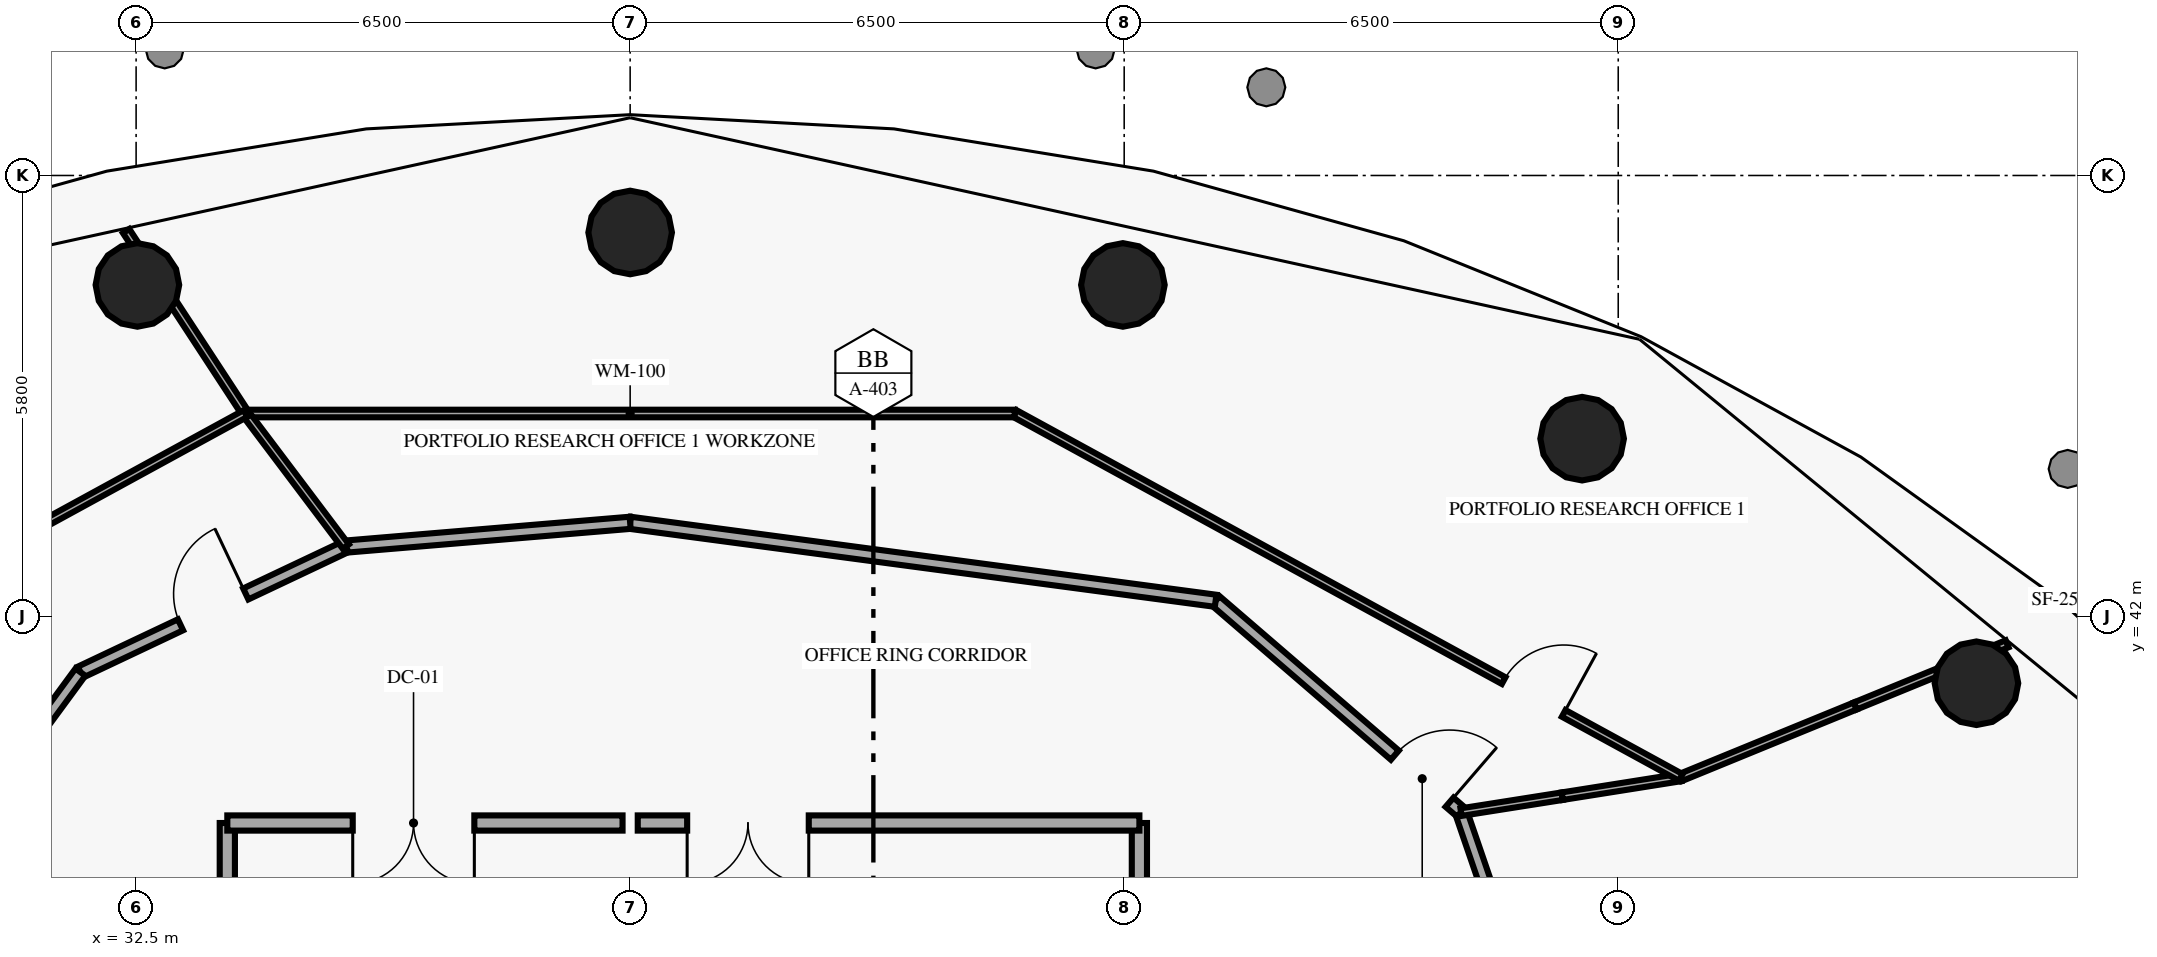
"""IFC4 building model, lengths in metres.
Left out: names, types, materials, properties, quantities, classifications, styles, units other than length and angle.
Written with IfcOpenShell. Run it as: python <this file> out.ifc"""

import sys

from ifc_helpers import new_model, si_unit, direction, frame, frame_2d, origin, origin_2d, place, context, subcontext, project, spatial, rectangle, circle, extrude, element, fill, save


model = new_model("IFC4")
c1 = context("Model", 3, precision=1e-05, world=origin(), true_north=direction((0.0, 1.0)))
c2 = subcontext(c1, "Body", "Model", "MODEL_VIEW")
j1 = project(units=[si_unit("LENGTHUNIT", "METRE"), si_unit("PLANEANGLEUNIT", "RADIAN")], contexts=[c1])
p1 = place(None, origin())
s1 = spatial("IfcSite", under=j1, at=p1, CompositionType="ELEMENT")
p2 = place(p1, origin())
s2 = spatial("IfcBuilding", under=s1, at=p2, CompositionType="ELEMENT")
p3 = place(p2, frame((0.0, 0.0, 65.55)))
s3 = spatial("IfcBuildingStorey", under=s2, at=p3, CompositionType="ELEMENT", Elevation=65.55)
for number, where, z_axis, x_axis in (
    (1, (56.713, 41.119, 0.0), (0.0, 0.0, 1.0), (1.0, 0.0, 0.0)),
    (2, (51.525, 44.337, 0.0), (0.0, 0.0, 1.0), (1.0, 0.0, 0.0)),
    (3, (45.483, 46.36, 0.0), (0.0, 0.0, 1.0), (1.0, 0.0, 0.0)),
    (4, (39.0, 47.05, 0.0), (0.0, 0.0, 1.0), (1.0, 0.0, 0.0)),
    (5, (32.517, 46.36, 0.0), (0.0, 0.0, 1.0), (1.0, 0.0, 0.0)),
):
    element("IfcColumn", number, at=place(p3, frame(where, z_axis=z_axis, x_axis=x_axis)), inside=s3, PredefinedType="COLUMN", context=c2, shape_type="SweptSolid", body=[
        extrude(circle(Radius=0.55, at=origin_2d()), origin(), (0.0, 0.0, 1.0), 3.8),
    ])
for number, where, z_axis, x_axis in (
    (6, (33.7, 37.4, 0.0), (0.0, 0.0, 1.0), (0.0, 1.0, 0.0)),
    (7, (45.7, 37.4, 0.0), (0.0, 0.0, 1.0), (0.0, 1.0, 0.0)),
):
    element("IfcWall", number, at=place(p3, frame(where, z_axis=z_axis, x_axis=x_axis)), inside=s3, PredefinedType="SOLIDWALL", context=c2, shape_type="SweptSolid", body=[
        extrude(rectangle(XDim=1.88, YDim=0.2, at=frame_2d((0.94, 0.0))), origin(), (0.0, 0.0, 1.0), 3.8),
    ])
p4 = place(p3, frame((38.9, 39.28, 0.0), z_axis=(0.0, 0.0, 1.0), x_axis=(-1.0, 0.0, 0.0)))
e8 = element("IfcWall", 8, at=p4, inside=s3, PredefinedType="SOLIDWALL", context=c2, shape_type="SweptSolid", body=[
    extrude(rectangle(XDim=5.2, YDim=0.2, at=frame_2d((2.6, 0.0))), origin(), (0.0, 0.0, 1.0), 3.8),
])
p5 = place(p4, frame((1.95, 0.0, 0.0)))
e9 = element("IfcOpeningElement", 9, at=p5, cuts=e8, PredefinedType="OPENING", context=c2, shape_type="SweptSolid", body=[
    extrude(rectangle(XDim=1.6, YDim=2.2, at=frame_2d((0.8, 1.1))), frame((0.0, 0.11, 0.0), z_axis=(0.0, -1.0, 0.0), x_axis=(1.0, 0.0, 0.0)), (0.0, 0.0, 1.0), 0.22),
])
p6 = place(p3, frame((45.7, 39.28, 0.0), z_axis=(0.0, 0.0, 1.0), x_axis=(-1.0, 0.0, 0.0)))
e10 = element("IfcWall", 10, at=p6, inside=s3, PredefinedType="SOLIDWALL", context=c2, shape_type="SweptSolid", body=[
    extrude(rectangle(XDim=6.6, YDim=0.2, at=frame_2d((3.3, 0.0))), origin(), (0.0, 0.0, 1.0), 3.8),
])
p7 = place(p6, frame((4.35, 0.0, 0.0)))
e11 = element("IfcOpeningElement", 11, at=p7, cuts=e10, PredefinedType="OPENING", context=c2, shape_type="SweptSolid", body=[
    extrude(rectangle(XDim=1.6, YDim=2.2, at=frame_2d((0.8, 1.1))), frame((0.0, 0.11, 0.0), z_axis=(0.0, -1.0, 0.0), x_axis=(1.0, 0.0, 0.0)), (0.0, 0.0, 1.0), 0.22),
])
p8 = place(p3, frame((52.798, 31.069, 0.0), z_axis=(0.0, 0.0, 1.0), x_axis=(-0.32452502426, 0.945877110744, 0.0)))
e12 = element("IfcWall", 12, at=p8, inside=s3, PredefinedType="PARTITIONING", context=c2, shape_type="SweptSolid", body=[
    extrude(rectangle(XDim=8.832, YDim=0.16, at=frame_2d((4.416, 0.0))), origin(), (0.0, 0.0, 1.0), 3.8),
])
p9 = place(p3, frame((46.703, 42.204, 0.0), z_axis=(0.0, 0.0, 1.0), x_axis=(0.757713718274, -0.652587098508, 0.0)))
e13 = element("IfcWall", 13, at=p9, inside=s3, PredefinedType="PARTITIONING", context=c2, shape_type="SweptSolid", body=[
    extrude(rectangle(XDim=4.261, YDim=0.16, at=frame_2d((2.131, 0.0))), origin(), (0.0, 0.0, 1.0), 3.8),
])
p10 = place(p9, frame((3.112, 0.0, 0.0)))
e14 = element("IfcOpeningElement", 14, at=p10, cuts=e13, PredefinedType="OPENING", context=c2, shape_type="SweptSolid", body=[
    extrude(rectangle(XDim=0.95, YDim=2.15, at=frame_2d((0.475, 1.075))), frame((0.0, 0.09, 0.0), z_axis=(0.0, -1.0, 0.0), x_axis=(1.0, 0.0, 0.0)), (0.0, 0.0, 1.0), 0.18),
])
p11 = place(p3, frame((46.703, 42.204, 0.0), z_axis=(0.0, 0.0, 1.0), x_axis=(-0.991247645473, 0.132015549627, 0.0)))
e15 = element("IfcWall", 15, at=p11, inside=s3, PredefinedType="PARTITIONING", context=c2, shape_type="SweptSolid", body=[
    extrude(rectangle(XDim=7.771, YDim=0.16, at=frame_2d((3.885, 0.0))), origin(), (0.0, 0.0, 1.0), 3.8),
])
p12 = place(p3, frame((39.0, 43.23, 0.0), z_axis=(0.0, 0.0, 1.0), x_axis=(-0.996516536006, -0.083395404345, 0.0)))
e16 = element("IfcWall", 16, at=p12, inside=s3, PredefinedType="PARTITIONING", context=c2, shape_type="SweptSolid", body=[
    extrude(rectangle(XDim=3.753, YDim=0.16, at=frame_2d((1.876, 0.0))), origin(), (0.0, 0.0, 1.0), 3.8),
])
p13 = place(p3, frame((31.767, 41.265, 0.0), z_axis=(0.0, 0.0, 1.0), x_axis=(0.90398213878, 0.427570219691, 0.0)))
e17 = element("IfcWall", 17, at=p13, inside=s3, PredefinedType="PARTITIONING", context=c2, shape_type="SweptSolid", body=[
    extrude(rectangle(XDim=3.864, YDim=0.16, at=frame_2d((1.932, 0.0))), origin(), (0.0, 0.0, 1.0), 3.8),
])
p14 = place(p13, frame((1.457, 0.0, 0.0)))
e18 = element("IfcOpeningElement", 18, at=p14, cuts=e17, PredefinedType="OPENING", context=c2, shape_type="SweptSolid", body=[
    extrude(rectangle(XDim=0.95, YDim=2.15, at=frame_2d((0.475, 1.075))), frame((0.0, 0.09, 0.0), z_axis=(0.0, -1.0, 0.0), x_axis=(1.0, 0.0, 0.0)), (0.0, 0.0, 1.0), 0.18),
])
p15 = place(p3, frame((31.767, 41.265, 0.0), z_axis=(0.0, 0.0, 1.0), x_axis=(-0.59176417482, -0.806111134645, 0.0)))
e19 = element("IfcWall", 19, at=p15, inside=s3, PredefinedType="PARTITIONING", context=c2, shape_type="SweptSolid", body=[
    extrude(rectangle(XDim=8.032, YDim=0.16, at=frame_2d((4.016, 0.0))), origin(), (0.0, 0.0, 1.0), 3.8),
])
p16 = place(p3, frame((49.932, 39.423, 0.0), z_axis=(0.0, 0.0, 1.0), x_axis=(0.987804034071, 0.155702248772, 0.0)))
e20 = element("IfcWall", 20, at=p16, inside=s3, PredefinedType="MOVABLE", context=c2, shape_type="SweptSolid", body=[
    extrude(rectangle(XDim=1.348, YDim=0.1, at=frame_2d((0.674, 0.0))), origin(), (0.0, 0.0, 1.0), 3.8),
])
p17 = place(p3, frame((51.264, 39.633, 0.0), z_axis=(0.0, 0.0, 1.0), x_axis=(0.9877140387, 0.15627212725, 0.0)))
e21 = element("IfcWall", 21, at=p17, inside=s3, PredefinedType="MOVABLE", context=c2, shape_type="SweptSolid", body=[
    extrude(rectangle(XDim=1.579, YDim=0.1, at=frame_2d((0.79, 0.0))), origin(), (0.0, 0.0, 1.0), 3.02),
])
p18 = place(p3, frame((52.824, 39.88, 0.0), z_axis=(0.0, 0.0, 1.0), x_axis=(0.92535552939, 0.379100440817, 0.0)))
e22 = element("IfcWall", 22, at=p18, inside=s3, PredefinedType="MOVABLE", context=c2, shape_type="SweptSolid", body=[
    extrude(rectangle(XDim=2.48, YDim=0.1, at=frame_2d((1.24, 0.0))), origin(), (0.0, 0.0, 1.0), 3.02),
])
p19 = place(p3, frame((55.119, 40.82, 0.0), z_axis=(0.0, 0.0, 1.0), x_axis=(0.925467678062, 0.378826578875, 0.0)))
e23 = element("IfcWall", 23, at=p19, inside=s3, PredefinedType="MOVABLE", context=c2, shape_type="SweptSolid", body=[
    extrude(rectangle(XDim=2.159, YDim=0.1, at=frame_2d((1.08, 0.0))), origin(), (0.0, 0.0, 1.0), 3.8),
])
p20 = place(p3, frame((44.06, 44.668, 0.0), z_axis=(0.0, 0.0, 1.0), x_axis=(0.877568372218, -0.479451511712, 0.0)))
e24 = element("IfcWall", 24, at=p20, inside=s3, PredefinedType="MOVABLE", context=c2, shape_type="SweptSolid", body=[
    extrude(rectangle(XDim=9.987, YDim=0.1, at=frame_2d((4.993, 0.0))), origin(), (0.0, 0.0, 1.0), 3.8),
])
p21 = place(p20, frame((7.33, 0.0, 0.0)))
e25 = element("IfcOpeningElement", 25, at=p21, cuts=e24, PredefinedType="OPENING", context=c2, shape_type="SweptSolid", body=[
    extrude(rectangle(XDim=0.9, YDim=2.1, at=frame_2d((0.45, 1.05))), frame((0.0, 0.06, 0.0), z_axis=(0.0, -1.0, 0.0), x_axis=(1.0, 0.0, 0.0)), (0.0, 0.0, 1.0), 0.12),
])
p22 = place(p3, frame((44.06, 44.668, 0.0), z_axis=(0.0, 0.0, 1.0), x_axis=(-1.0, 0.0, 0.0)))
e26 = element("IfcWall", 26, at=p22, inside=s3, PredefinedType="MOVABLE", context=c2, shape_type="SweptSolid", body=[
    extrude(rectangle(XDim=10.12, YDim=0.1, at=frame_2d((5.06, 0.0))), origin(), (0.0, 0.0, 1.0), 3.8),
])
p23 = place(p3, frame((35.26, 42.917, 0.0), z_axis=(0.0, 0.0, 1.0), x_axis=(-0.601993273634, 0.798501157482, 0.0)))
e27 = element("IfcWall", 27, at=p23, inside=s3, PredefinedType="MOVABLE", context=c2, shape_type="SweptSolid", body=[
    extrude(rectangle(XDim=2.193, YDim=0.1, at=frame_2d((1.096, 0.0))), origin(), (0.0, 0.0, 1.0), 3.8),
])
p24 = place(p3, frame((33.94, 44.668, 0.0), z_axis=(0.0, 0.0, 1.0), x_axis=(-0.54751296274, 0.836797201018, 0.0)))
e28 = element("IfcWall", 28, at=p24, inside=s3, PredefinedType="MOVABLE", context=c2, shape_type="SweptSolid", body=[
    extrude(rectangle(XDim=2.869, YDim=0.1, at=frame_2d((1.435, 0.0))), origin(), (0.0, 0.0, 1.0), 3.8),
])
p25 = place(p3, frame((25.176, 39.88, 0.0), z_axis=(0.0, 0.0, 1.0), x_axis=(0.877568372218, 0.479451511712, 0.0)))
e29 = element("IfcWall", 29, at=p25, inside=s3, PredefinedType="MOVABLE", context=c2, shape_type="SweptSolid", body=[
    extrude(rectangle(XDim=9.987, YDim=0.1, at=frame_2d((4.993, 0.0))), origin(), (0.0, 0.0, 1.0), 3.8),
])
p26 = place(p25, frame((4.543, 0.0, 0.0)))
e30 = element("IfcOpeningElement", 30, at=p26, cuts=e29, PredefinedType="OPENING", context=c2, shape_type="SweptSolid", body=[
    extrude(rectangle(XDim=0.9, YDim=2.1, at=frame_2d((0.45, 1.05))), frame((0.0, 0.06, 0.0), z_axis=(0.0, -1.0, 0.0), x_axis=(1.0, 0.0, 0.0)), (0.0, 0.0, 1.0), 0.12),
])
p27 = place(p5, origin())
e31 = element("IfcDoor", 31, at=p27, inside=s3, OperationType="DOUBLE_DOOR_SINGLE_SWING", PredefinedType="DOOR", context=c2, shape_type="SweptSolid", body=[
    extrude(rectangle(XDim=1.6, YDim=2.2, at=frame_2d((0.8, 1.1))), frame((0.0, 0.025, 0.0), z_axis=(0.0, -1.0, 0.0), x_axis=(1.0, 0.0, 0.0)), (0.0, 0.0, 1.0), 0.05),
])
fill(e9, e31)
p28 = place(p7, origin())
e32 = element("IfcDoor", 32, at=p28, inside=s3, OperationType="DOUBLE_DOOR_SINGLE_SWING", PredefinedType="DOOR", context=c2, shape_type="SweptSolid", body=[
    extrude(rectangle(XDim=1.6, YDim=2.2, at=frame_2d((0.8, 1.1))), frame((0.0, 0.025, 0.0), z_axis=(0.0, -1.0, 0.0), x_axis=(1.0, 0.0, 0.0)), (0.0, 0.0, 1.0), 0.05),
])
fill(e11, e32)
p29 = place(p10, origin())
e33 = element("IfcDoor", 33, at=p29, inside=s3, OperationType="SINGLE_SWING_RIGHT", PredefinedType="DOOR", context=c2, shape_type="SweptSolid", body=[
    extrude(rectangle(XDim=0.95, YDim=2.15, at=frame_2d((0.475, 1.075))), frame((0.0, 0.025, 0.0), z_axis=(0.0, -1.0, 0.0), x_axis=(1.0, 0.0, 0.0)), (0.0, 0.0, 1.0), 0.05),
])
fill(e14, e33)
p30 = place(p14, origin())
e34 = element("IfcDoor", 34, at=p30, inside=s3, OperationType="SINGLE_SWING_RIGHT", PredefinedType="DOOR", context=c2, shape_type="SweptSolid", body=[
    extrude(rectangle(XDim=0.95, YDim=2.15, at=frame_2d((0.475, 1.075))), frame((0.0, 0.025, 0.0), z_axis=(0.0, -1.0, 0.0), x_axis=(1.0, 0.0, 0.0)), (0.0, 0.0, 1.0), 0.05),
])
fill(e18, e34)
p31 = place(p21, origin())
e35 = element("IfcDoor", 35, at=p31, inside=s3, OperationType="SINGLE_SWING_RIGHT", PredefinedType="DOOR", context=c2, shape_type="SweptSolid", body=[
    extrude(rectangle(XDim=0.9, YDim=2.1, at=frame_2d((0.45, 1.05))), frame((0.0, 0.025, 0.0), z_axis=(0.0, -1.0, 0.0), x_axis=(1.0, 0.0, 0.0)), (0.0, 0.0, 1.0), 0.05),
])
fill(e25, e35)
save(model, sys.argv[1])
